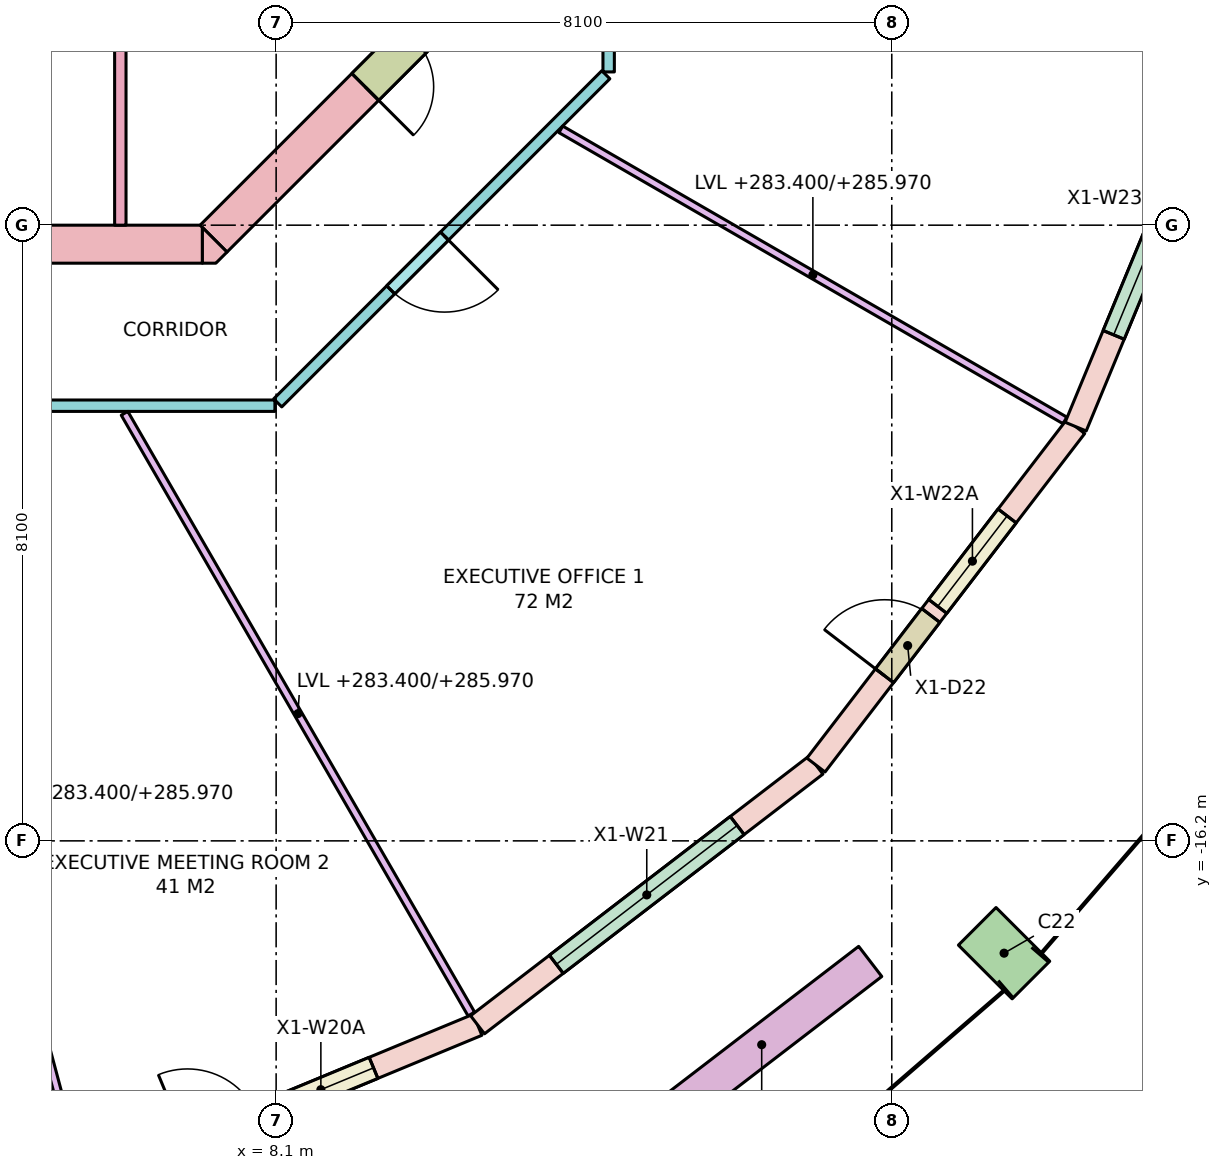
"""IFC4 building model, lengths in metres.
Left out: names, types, materials, properties, quantities, classifications, styles, units other than length and angle.
Written with IfcOpenShell. Run it as: python <this file> out.ifc"""

import sys

from ifc_helpers import new_model, si_unit, direction, frame, frame_2d, origin, origin_2d, place, context, subcontext, project, spatial, polyline, rectangle, outline, extrude, element, fill, save


model = new_model("IFC4")
c1 = context("Model", 3, precision=1e-05, world=origin(), true_north=direction((0.0, 1.0)))
c2 = subcontext(c1, "Body", "Model", "MODEL_VIEW")
j1 = project(units=[si_unit("LENGTHUNIT", "METRE"), si_unit("PLANEANGLEUNIT", "RADIAN")], contexts=[c1])
p1 = place(None, origin())
s1 = spatial("IfcSite", under=j1, at=p1, CompositionType="ELEMENT")
p2 = place(p1, origin())
s2 = spatial("IfcBuilding", under=s1, at=p2, CompositionType="ELEMENT")
p3 = place(p2, frame((0.0, 0.0, 283.4)))
s3 = spatial("IfcBuildingStorey", under=s2, at=p3, CompositionType="ELEMENT", Elevation=283.4)
p4 = place(p3, frame((17.678, -17.678, 0.0), z_axis=(0.0, 0.0, 1.0), x_axis=(0.707106781187, 0.707106781187, 0.0)))
e1 = element("IfcColumn", 1, at=p4, inside=s3, PredefinedType="COLUMN", context=c2, shape_type="SweptSolid", body=[
    extrude(rectangle(XDim=0.7, YDim=1.0, at=origin_2d()), origin(), (0.0, 0.0, 1.0), 3.7),
])
p5 = place(p3, frame((-7.13, -8.35, -0.28), z_axis=(0.0, 0.0, 1.0), x_axis=(1.0, 0.0, 0.0)))
e2 = element("IfcWall", 2, at=p5, inside=s3, PredefinedType="SHEAR", context=c2, shape_type="SweptSolid", body=[
    extrude(rectangle(XDim=14.26, YDim=0.5, at=frame_2d((7.13, 0.0))), origin(), (0.0, 0.0, 1.0), 3.7),
])
p6 = place(p5, frame((8.08, 0.0, 0.28)))
e3 = element("IfcOpeningElement", 3, at=p6, cuts=e2, PredefinedType="OPENING", context=c2, shape_type="SweptSolid", body=[
    extrude(rectangle(XDim=0.7, YDim=2.1, at=frame_2d((0.35, 1.05))), frame((0.0, 0.26, 0.0), z_axis=(0.0, -1.0, 0.0), x_axis=(1.0, 0.0, 0.0)), (0.0, 0.0, 1.0), 0.52),
])
p7 = place(p5, frame((6.205, 0.0, 0.28)))
e4 = element("IfcOpeningElement", 4, at=p7, cuts=e2, PredefinedType="OPENING", context=c2, shape_type="SweptSolid", body=[
    extrude(rectangle(XDim=0.9, YDim=2.1, at=frame_2d((0.45, 1.05))), frame((0.0, 0.26, 0.0), z_axis=(0.0, -1.0, 0.0), x_axis=(1.0, 0.0, 0.0)), (0.0, 0.0, 1.0), 0.52),
])
p8 = place(p5, frame((10.667, 0.0, 0.28)))
e5 = element("IfcOpeningElement", 5, at=p8, cuts=e2, PredefinedType="OPENING", context=c2, shape_type="SweptSolid", body=[
    extrude(rectangle(XDim=0.9, YDim=2.1, at=frame_2d((0.45, 1.05))), frame((0.0, 0.26, 0.0), z_axis=(0.0, -1.0, 0.0), x_axis=(1.0, 0.0, 0.0)), (0.0, 0.0, 1.0), 0.52),
])
p9 = place(p3, frame((10.277, -5.277, -0.28), z_axis=(0.0, 0.0, 1.0), x_axis=(-0.707106781187, -0.707106781187, 0.0)))
e6 = element("IfcWall", 6, at=p9, inside=s3, PredefinedType="SHEAR", context=c2, shape_type="SweptSolid", body=[
    extrude(rectangle(XDim=4.243, YDim=0.5, at=frame_2d((2.121, 0.0))), origin(), (0.0, 0.0, 1.0), 3.7),
])
p10 = place(p9, frame((0.52, 0.0, 0.28)))
e7 = element("IfcOpeningElement", 7, at=p10, cuts=e6, PredefinedType="OPENING", context=c2, shape_type="SweptSolid", body=[
    extrude(rectangle(XDim=0.9, YDim=2.1, at=frame_2d((0.45, 1.05))), frame((0.0, 0.26, 0.0), z_axis=(0.0, -1.0, 0.0), x_axis=(1.0, 0.0, 0.0)), (0.0, 0.0, 1.0), 0.52),
])
p11 = place(p3, frame((0.0, 0.0, -0.28)))
e8 = element("IfcWall", 8, at=p11, inside=s3, PredefinedType="SHEAR", context=c2, shape_type="SweptSolid", body=[
    extrude(outline(polyline([(7.307, -8.6), (7.13, -8.6), (7.13, -8.13), (7.454, -8.454), (7.307, -8.6)])), origin(), (0.0, 0.0, 1.0), 3.7),
])
p12 = place(p3, frame((5.565, -20.767, 0.0), z_axis=(0.0, 0.0, 1.0), x_axis=(0.92387156362, 0.382702670405, 0.0)))
e9 = element("IfcWall", 9, at=p12, inside=s3, PredefinedType="STANDARD", context=c2, shape_type="SweptSolid", body=[
    extrude(rectangle(XDim=5.613, YDim=0.3, at=frame_2d((2.806, 0.0))), origin(), (0.0, 0.0, 1.0), 3.42),
])
p13 = place(p12, frame((1.481, 0.0, 0.0)))
e10 = element("IfcOpeningElement", 10, at=p13, cuts=e9, PredefinedType="OPENING", context=c2, shape_type="SweptSolid", body=[
    extrude(rectangle(XDim=1.0, YDim=2.4, at=frame_2d((0.5, 1.2))), frame((0.0, 0.16, 0.0), z_axis=(0.0, -1.0, 0.0), x_axis=(1.0, 0.0, 0.0)), (0.0, 0.0, 1.0), 0.32),
])
p14 = place(p12, frame((2.631, 0.0, 0.8)))
e11 = element("IfcOpeningElement", 11, at=p14, cuts=e9, PredefinedType="OPENING", context=c2, shape_type="SweptSolid", body=[
    extrude(rectangle(XDim=1.5, YDim=2.4, at=frame_2d((0.75, 1.2))), frame((0.0, 0.16, 0.0), z_axis=(0.0, -1.0, 0.0), x_axis=(1.0, 0.0, 0.0)), (0.0, 0.0, 1.0), 0.32),
])
p15 = place(p3, frame((10.75, -18.619, 0.0), z_axis=(0.0, 0.0, 1.0), x_axis=(0.793380165925, 0.608726467567, 0.0)))
e12 = element("IfcWall", 12, at=p15, inside=s3, PredefinedType="STANDARD", context=c2, shape_type="SweptSolid", body=[
    extrude(rectangle(XDim=5.613, YDim=0.3, at=frame_2d((2.806, 0.0))), origin(), (0.0, 0.0, 1.0), 3.42),
])
p16 = place(p15, frame((1.306, 0.0, 0.8)))
e13 = element("IfcOpeningElement", 13, at=p16, cuts=e12, PredefinedType="OPENING", context=c2, shape_type="SweptSolid", body=[
    extrude(rectangle(XDim=3.0, YDim=2.4, at=frame_2d((1.5, 1.2))), frame((0.0, 0.16, 0.0), z_axis=(0.0, -1.0, 0.0), x_axis=(1.0, 0.0, 0.0)), (0.0, 0.0, 1.0), 0.32),
])
p17 = place(p3, frame((15.203, -15.203, 0.0), z_axis=(0.0, 0.0, 1.0), x_axis=(0.608726467567, 0.793380165925, 0.0)))
e14 = element("IfcWall", 14, at=p17, inside=s3, PredefinedType="STANDARD", context=c2, shape_type="SweptSolid", body=[
    extrude(rectangle(XDim=5.613, YDim=0.3, at=frame_2d((2.806, 0.0))), origin(), (0.0, 0.0, 1.0), 3.42),
])
p18 = place(p17, frame((1.481, 0.0, 0.0)))
e15 = element("IfcOpeningElement", 15, at=p18, cuts=e14, PredefinedType="OPENING", context=c2, shape_type="SweptSolid", body=[
    extrude(rectangle(XDim=1.0, YDim=2.4, at=frame_2d((0.5, 1.2))), frame((0.0, 0.16, 0.0), z_axis=(0.0, -1.0, 0.0), x_axis=(1.0, 0.0, 0.0)), (0.0, 0.0, 1.0), 0.32),
])
p19 = place(p17, frame((2.631, 0.0, 0.8)))
e16 = element("IfcOpeningElement", 16, at=p19, cuts=e14, PredefinedType="OPENING", context=c2, shape_type="SweptSolid", body=[
    extrude(rectangle(XDim=1.5, YDim=2.4, at=frame_2d((0.75, 1.2))), frame((0.0, 0.16, 0.0), z_axis=(0.0, -1.0, 0.0), x_axis=(1.0, 0.0, 0.0)), (0.0, 0.0, 1.0), 0.32),
])
p20 = place(p3, frame((18.619, -10.75, 0.0), z_axis=(0.0, 0.0, 1.0), x_axis=(0.382702670405, 0.92387156362, 0.0)))
e17 = element("IfcWall", 17, at=p20, inside=s3, PredefinedType="STANDARD", context=c2, shape_type="SweptSolid", body=[
    extrude(rectangle(XDim=5.613, YDim=0.3, at=frame_2d((2.806, 0.0))), origin(), (0.0, 0.0, 1.0), 3.42),
])
p21 = place(p20, frame((1.306, 0.0, 0.8)))
e18 = element("IfcOpeningElement", 18, at=p21, cuts=e17, PredefinedType="OPENING", context=c2, shape_type="SweptSolid", body=[
    extrude(rectangle(XDim=3.0, YDim=2.4, at=frame_2d((1.5, 1.2))), frame((0.0, 0.16, 0.0), z_axis=(0.0, -1.0, 0.0), x_axis=(1.0, 0.0, 0.0)), (0.0, 0.0, 1.0), 0.32),
])
p22 = place(p3, frame((13.061, -19.978, 0.0), z_axis=(0.0, 0.0, 1.0), x_axis=(0.793326845617, 0.608795955984, 0.0)))
e19 = element("IfcWall", 19, at=p22, inside=s3, PredefinedType="PARAPET", context=c2, shape_type="SweptSolid", body=[
    extrude(rectangle(XDim=3.6, YDim=0.5, at=frame_2d((1.8, 0.0))), origin(), (0.0, 0.0, 1.0), 0.9),
])
p23 = place(p3, frame((6.05, -8.1, 0.0), z_axis=(0.0, 0.0, 1.0), x_axis=(0.0, 1.0, 0.0)))
e20 = element("IfcWall", 20, at=p23, inside=s3, PredefinedType="PARTITIONING", context=c2, shape_type="SweptSolid", body=[
    extrude(rectangle(XDim=3.6, YDim=0.15, at=frame_2d((1.8, 0.0))), origin(), (0.0, 0.0, 1.0), 3.42),
])
p24 = place(p3, frame((12.438, -6.121, 0.0), z_axis=(0.0, 0.0, 1.0), x_axis=(-0.707106781187, -0.707106781187, 0.0)))
e21 = element("IfcWall", 21, at=p24, inside=s3, PredefinedType="PARTITIONING", context=c2, shape_type="SweptSolid", body=[
    extrude(rectangle(XDim=6.105, YDim=0.15, at=frame_2d((3.053, 0.0))), origin(), (0.0, 0.0, 1.0), 2.57),
])
p25 = place(p24, frame((3.002, 0.0, 0.0)))
e22 = element("IfcOpeningElement", 22, at=p25, cuts=e21, PredefinedType="OPENING", context=c2, shape_type="SweptSolid", body=[
    extrude(rectangle(XDim=1.0, YDim=2.1, at=frame_2d((0.5, 1.05))), frame((0.0, 0.085, 0.0), z_axis=(0.0, -1.0, 0.0), x_axis=(1.0, 0.0, 0.0)), (0.0, 0.0, 1.0), 0.17),
])
p26 = place(p3, frame((8.084, -10.475, 0.0), z_axis=(0.0, 0.0, 1.0), x_axis=(-1.0, 0.0, 0.0)))
e23 = element("IfcWall", 23, at=p26, inside=s3, PredefinedType="PARTITIONING", context=c2, shape_type="SweptSolid", body=[
    extrude(rectangle(XDim=16.167, YDim=0.15, at=frame_2d((8.084, 0.0))), origin(), (0.0, 0.0, 1.0), 2.57),
])
p27 = place(p26, frame((12.065, 0.0, 0.0)))
e24 = element("IfcOpeningElement", 24, at=p27, cuts=e23, PredefinedType="OPENING", context=c2, shape_type="SweptSolid", body=[
    extrude(rectangle(XDim=0.9, YDim=2.1, at=frame_2d((0.45, 1.05))), frame((0.0, 0.085, 0.0), z_axis=(0.0, -1.0, 0.0), x_axis=(1.0, 0.0, 0.0)), (0.0, 0.0, 1.0), 0.17),
])
p28 = place(p26, frame((7.584, 0.0, 0.0)))
e25 = element("IfcOpeningElement", 25, at=p28, cuts=e23, PredefinedType="OPENING", context=c2, shape_type="SweptSolid", body=[
    extrude(rectangle(XDim=1.0, YDim=2.1, at=frame_2d((0.5, 1.05))), frame((0.0, 0.085, 0.0), z_axis=(0.0, -1.0, 0.0), x_axis=(1.0, 0.0, 0.0)), (0.0, 0.0, 1.0), 0.17),
])
p29 = place(p26, frame((3.153, 0.0, 0.0)))
e26 = element("IfcOpeningElement", 26, at=p29, cuts=e23, PredefinedType="OPENING", context=c2, shape_type="SweptSolid", body=[
    extrude(rectangle(XDim=1.0, YDim=2.1, at=frame_2d((0.5, 1.05))), frame((0.0, 0.085, 0.0), z_axis=(0.0, -1.0, 0.0), x_axis=(1.0, 0.0, 0.0)), (0.0, 0.0, 1.0), 0.17),
])
p30 = place(p3, frame((12.475, 6.084, 0.0), z_axis=(0.0, 0.0, 1.0), x_axis=(0.0, -1.0, 0.0)))
e27 = element("IfcWall", 27, at=p30, inside=s3, PredefinedType="PARTITIONING", context=c2, shape_type="SweptSolid", body=[
    extrude(rectangle(XDim=12.167, YDim=0.15, at=frame_2d((6.084, 0.0))), origin(), (0.0, 0.0, 1.0), 2.57),
])
p31 = place(p30, frame((8.601, 0.0, 0.0)))
e28 = element("IfcOpeningElement", 28, at=p31, cuts=e27, PredefinedType="OPENING", context=c2, shape_type="SweptSolid", body=[
    extrude(rectangle(XDim=1.0, YDim=2.1, at=frame_2d((0.5, 1.05))), frame((0.0, 0.085, 0.0), z_axis=(0.0, -1.0, 0.0), x_axis=(1.0, 0.0, 0.0)), (0.0, 0.0, 1.0), 0.17),
])
p32 = place(p30, frame((2.167, 0.0, 0.0)))
e29 = element("IfcOpeningElement", 29, at=p32, cuts=e27, PredefinedType="OPENING", context=c2, shape_type="SweptSolid", body=[
    extrude(rectangle(XDim=1.8, YDim=2.1, at=frame_2d((0.9, 1.05))), frame((0.0, 0.085, 0.0), z_axis=(0.0, -1.0, 0.0), x_axis=(1.0, 0.0, 0.0)), (0.0, 0.0, 1.0), 0.17),
])
p33 = place(p3, frame((2.831, -10.564, 0.0), z_axis=(0.0, 0.0, 1.0), x_axis=(0.258796321138, -0.965931914871, 0.0)))
e30 = element("IfcWall", 30, at=p33, inside=s3, PredefinedType="PARTITIONING", context=c2, shape_type="SweptSolid", body=[
    extrude(rectangle(XDim=10.4, YDim=0.1, at=frame_2d((5.2, 0.0))), origin(), (0.0, 0.0, 1.0), 2.57),
])
p34 = place(p3, frame((6.105, -10.575, 0.0), z_axis=(0.0, 0.0, 1.0), x_axis=(0.500020406621, -0.866013621696, 0.0)))
e31 = element("IfcWall", 31, at=p34, inside=s3, PredefinedType="PARTITIONING", context=c2, shape_type="SweptSolid", body=[
    extrude(rectangle(XDim=9.126, YDim=0.1, at=frame_2d((4.563, 0.0))), origin(), (0.0, 0.0, 1.0), 2.57),
])
p35 = place(p3, frame((11.846, -6.839, 0.0), z_axis=(0.0, 0.0, 1.0), x_axis=(0.866007734672, -0.500030602552, 0.0)))
e32 = element("IfcWall", 32, at=p35, inside=s3, PredefinedType="PARTITIONING", context=c2, shape_type="SweptSolid", body=[
    extrude(rectangle(XDim=7.658, YDim=0.1, at=frame_2d((3.829, 0.0))), origin(), (0.0, 0.0, 1.0), 2.57),
])
p36 = place(p14, origin())
e33 = element("IfcWindow", 33, at=p36, inside=s3, PartitioningType="SINGLE_PANEL", PredefinedType="WINDOW", context=c2, shape_type="SweptSolid", body=[
    extrude(rectangle(XDim=1.5, YDim=2.4, at=frame_2d((0.75, 1.2))), frame((0.0, 0.03, 0.0), z_axis=(0.0, -1.0, 0.0), x_axis=(1.0, 0.0, 0.0)), (0.0, 0.0, 1.0), 0.06),
])
fill(e11, e33)
p37 = place(p16, origin())
e34 = element("IfcWindow", 34, at=p37, inside=s3, PartitioningType="SINGLE_PANEL", PredefinedType="WINDOW", context=c2, shape_type="SweptSolid", body=[
    extrude(rectangle(XDim=3.0, YDim=2.4, at=frame_2d((1.5, 1.2))), frame((0.0, 0.03, 0.0), z_axis=(0.0, -1.0, 0.0), x_axis=(1.0, 0.0, 0.0)), (0.0, 0.0, 1.0), 0.06),
])
fill(e13, e34)
p38 = place(p18, origin())
e35 = element("IfcDoor", 35, at=p38, inside=s3, OperationType="SINGLE_SWING_LEFT", PredefinedType="DOOR", context=c2, shape_type="SweptSolid", body=[
    extrude(rectangle(XDim=1.0, YDim=2.4, at=frame_2d((0.5, 1.2))), frame((0.0, 0.025, 0.0), z_axis=(0.0, -1.0, 0.0), x_axis=(1.0, 0.0, 0.0)), (0.0, 0.0, 1.0), 0.05),
])
fill(e15, e35)
p39 = place(p19, origin())
e36 = element("IfcWindow", 36, at=p39, inside=s3, PartitioningType="SINGLE_PANEL", PredefinedType="WINDOW", context=c2, shape_type="SweptSolid", body=[
    extrude(rectangle(XDim=1.5, YDim=2.4, at=frame_2d((0.75, 1.2))), frame((0.0, 0.03, 0.0), z_axis=(0.0, -1.0, 0.0), x_axis=(1.0, 0.0, 0.0)), (0.0, 0.0, 1.0), 0.06),
])
fill(e16, e36)
p40 = place(p21, origin())
e37 = element("IfcWindow", 37, at=p40, inside=s3, PartitioningType="SINGLE_PANEL", PredefinedType="WINDOW", context=c2, shape_type="SweptSolid", body=[
    extrude(rectangle(XDim=3.0, YDim=2.4, at=frame_2d((1.5, 1.2))), frame((0.0, 0.03, 0.0), z_axis=(0.0, -1.0, 0.0), x_axis=(1.0, 0.0, 0.0)), (0.0, 0.0, 1.0), 0.06),
])
fill(e18, e37)
p41 = place(p10, origin())
e38 = element("IfcDoor", 38, at=p41, inside=s3, OperationType="SINGLE_SWING_RIGHT", PredefinedType="DOOR", context=c2, shape_type="SweptSolid", body=[
    extrude(rectangle(XDim=0.9, YDim=2.1, at=frame_2d((0.45, 1.05))), frame((0.0, 0.025, 0.0), z_axis=(0.0, -1.0, 0.0), x_axis=(1.0, 0.0, 0.0)), (0.0, 0.0, 1.0), 0.05),
])
fill(e7, e38)
p42 = place(p25, origin())
e39 = element("IfcDoor", 39, at=p42, inside=s3, OperationType="SINGLE_SWING_LEFT", PredefinedType="DOOR", context=c2, shape_type="SweptSolid", body=[
    extrude(rectangle(XDim=1.0, YDim=2.1, at=frame_2d((0.5, 1.05))), frame((0.0, 0.025, 0.0), z_axis=(0.0, -1.0, 0.0), x_axis=(1.0, 0.0, 0.0)), (0.0, 0.0, 1.0), 0.05),
])
fill(e22, e39)
save(model, sys.argv[1])
